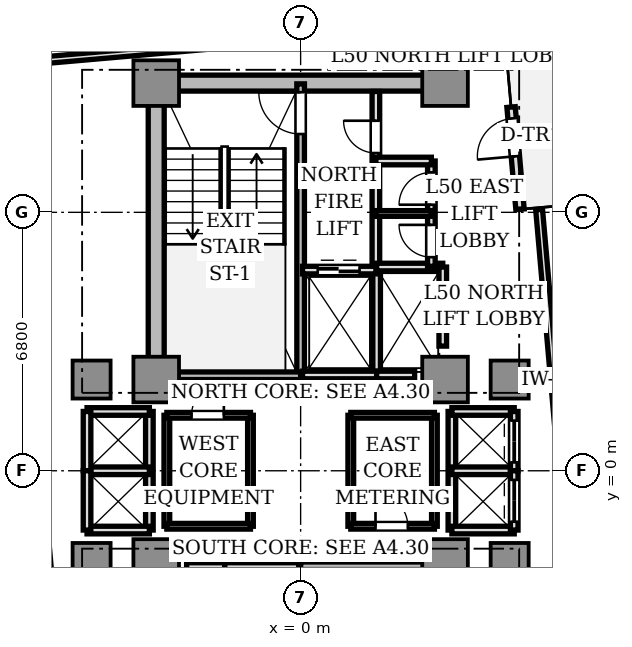
"""IFC4 building model, lengths in metres.
Left out: names, types, materials, properties, quantities, classifications, styles, units other than length and angle.
Written with IfcOpenShell. Run it as: python <this file> out.ifc"""

import sys

from ifc_helpers import new_model, si_unit, direction, frame, frame_2d, origin, origin_2d, place, context, subcontext, project, spatial, rectangle, extrude, source, transform, mapped, element, fill, save


model = new_model("IFC4")
c1 = context("Model", 3, precision=1e-05, world=origin(), true_north=direction((0.0, 1.0)))
c2 = subcontext(c1, "Body", "Model", "MODEL_VIEW")
j1 = project(units=[si_unit("LENGTHUNIT", "METRE"), si_unit("PLANEANGLEUNIT", "RADIAN")], contexts=[c1])
p1 = place(None, origin())
s1 = spatial("IfcSite", under=j1, at=p1, CompositionType="ELEMENT")
p2 = place(p1, origin())
s2 = spatial("IfcBuilding", under=s1, at=p2, CompositionType="ELEMENT")
p3 = place(p2, frame((0.0, 0.0, 181.9)))
s3 = spatial("IfcBuildingStorey", under=s2, at=p3, CompositionType="ELEMENT", Elevation=181.9)
p4 = place(p3, frame((-3.55, 10.2, 0.0), z_axis=(0.0, 0.0, 1.0), x_axis=(1.0, 0.0, 0.0)))
e1 = element("IfcWall", 1, at=p4, inside=s3, PredefinedType="SHEAR", context=c2, shape_type="SweptSolid", body=[
    extrude(rectangle(XDim=7.1, YDim=0.42, at=frame_2d((3.55, 0.0))), origin(), (0.0, 0.0, 1.0), 3.11),
])
p5 = place(p3, frame((-3.8, 2.85, 0.0), z_axis=(0.0, 0.0, 1.0), x_axis=(0.0, 1.0, 0.0)))
e2 = element("IfcWall", 2, at=p5, inside=s3, PredefinedType="SHEAR", context=c2, shape_type="SweptSolid", body=[
    extrude(rectangle(XDim=6.9, YDim=0.42, at=frame_2d((3.45, 0.0))), origin(), (0.0, 0.0, 1.0), 3.11),
])
m1 = source(origin(), c2, "Body", "SweptSolid", [
    extrude(rectangle(XDim=1.2, YDim=1.2, at=origin_2d()), origin(), (0.0, 0.0, 1.0), 3.11),
])
for number, where, z_axis, x_axis in (
    (3, (-3.8, 2.4, 0.0), (0.0, 0.0, 1.0), (1.0, 0.0, 0.0)),
    (4, (3.8, 2.4, 0.0), (0.0, 0.0, 1.0), (1.0, 0.0, 0.0)),
    (5, (-3.8, 10.2, 0.0), (0.0, 0.0, 1.0), (1.0, 0.0, 0.0)),
    (6, (3.8, 10.2, 0.0), (0.0, 0.0, 1.0), (1.0, 0.0, 0.0)),
    (7, (-3.8, -2.4, 0.0), (0.0, 0.0, 1.0), (1.0, 0.0, 0.0)),
    (8, (3.8, -2.4, 0.0), (0.0, 0.0, 1.0), (1.0, 0.0, 0.0)),
):
    element("IfcColumn", number, at=place(p3, frame(where, z_axis=z_axis, x_axis=x_axis)), inside=s3, PredefinedType="COLUMN", context=c2, shape_type="MappedRepresentation", body=[
        mapped(m1, transform((0.0, 0.0, 0.0), scale=1.0)),
    ])
m2 = source(origin(), c2, "Body", "SweptSolid", [
    extrude(rectangle(XDim=1.0, YDim=1.0, at=origin_2d()), origin(), (0.0, 0.0, 1.0), 3.11),
])
for number, where, z_axis, x_axis in (
    (9, (5.5, 2.4, 0.0), (0.0, 0.0, 1.0), (1.0, 0.0, 0.0)),
    (10, (-5.5, 2.4, 0.0), (0.0, 0.0, 1.0), (1.0, 0.0, 0.0)),
    (11, (5.5, -2.4, 0.0), (0.0, 0.0, 1.0), (1.0, 0.0, 0.0)),
    (12, (-5.5, -2.4, 0.0), (0.0, 0.0, 1.0), (1.0, 0.0, 0.0)),
):
    element("IfcColumn", number, at=place(p3, frame(where, z_axis=z_axis, x_axis=x_axis)), inside=s3, PredefinedType="COLUMN", context=c2, shape_type="MappedRepresentation", body=[
        mapped(m2, transform((0.0, 0.0, 0.0), scale=1.0)),
    ])
p6 = place(p3, frame((5.772, 6.879, 0.0), z_axis=(0.0, 0.0, 1.0), x_axis=(-0.087168071984, 0.996193619346, 0.0)))
e13 = element("IfcWall", 13, at=p6, inside=s3, PredefinedType="STANDARD", context=c2, shape_type="SweptSolid", body=[
    extrude(rectangle(XDim=2.7, YDim=0.22, at=frame_2d((1.35, 0.0))), origin(), (0.0, 0.0, 1.0), 3.11),
])
p7 = place(p6, frame((1.4, 0.0, 0.0)))
e14 = element("IfcOpeningElement", 14, at=p7, cuts=e13, PredefinedType="OPENING", context=c2, shape_type="SweptSolid", body=[
    extrude(rectangle(XDim=1.0, YDim=2.2, at=frame_2d((0.5, 1.1))), frame((0.0, 0.12, 0.0), z_axis=(0.0, -1.0, 0.0), x_axis=(1.0, 0.0, 0.0)), (0.0, 0.0, 1.0), 0.24),
])
p8 = place(p3, frame((0.0, 2.5, 0.0), z_axis=(0.0, 0.0, 1.0), x_axis=(0.0, 1.0, 0.0)))
e15 = element("IfcWall", 15, at=p8, inside=s3, PredefinedType="SOLIDWALL", context=c2, shape_type="SweptSolid", body=[
    extrude(rectangle(XDim=7.68, YDim=0.2, at=frame_2d((3.84, 0.0))), origin(), (0.0, 0.0, 1.0), 3.11),
])
p9 = place(p8, frame((6.36, 0.0, 0.0)))
e16 = element("IfcOpeningElement", 16, at=p9, cuts=e15, PredefinedType="OPENING", context=c2, shape_type="SweptSolid", body=[
    extrude(rectangle(XDim=1.1, YDim=2.15, at=frame_2d((0.55, 1.075))), frame((0.0, 0.11, 0.0), z_axis=(0.0, -1.0, 0.0), x_axis=(1.0, 0.0, 0.0)), (0.0, 0.0, 1.0), 0.22),
])
p10 = place(p3, frame((-3.72, 2.5, 0.0), z_axis=(0.0, 0.0, 1.0), x_axis=(1.0, 0.0, 0.0)))
e17 = element("IfcWall", 17, at=p10, inside=s3, PredefinedType="SOLIDWALL", context=c2, shape_type="SweptSolid", body=[
    extrude(rectangle(XDim=3.72, YDim=0.2, at=frame_2d((1.86, 0.0))), origin(), (0.0, 0.0, 1.0), 3.11),
])
p11 = place(p3, frame((0.0, -10.18, 0.0), z_axis=(0.0, 0.0, 1.0), x_axis=(0.0, 1.0, 0.0)))
e18 = element("IfcWall", 18, at=p11, inside=s3, PredefinedType="SOLIDWALL", context=c2, shape_type="SweptSolid", body=[
    extrude(rectangle(XDim=7.68, YDim=0.2, at=frame_2d((3.84, 0.0))), origin(), (0.0, 0.0, 1.0), 3.11),
])
p12 = place(p11, frame((0.28, 0.0, 0.0)))
e19 = element("IfcOpeningElement", 19, at=p12, cuts=e18, PredefinedType="OPENING", context=c2, shape_type="SweptSolid", body=[
    extrude(rectangle(XDim=1.1, YDim=2.15, at=frame_2d((0.55, 1.075))), frame((0.0, 0.11, 0.0), z_axis=(0.0, -1.0, 0.0), x_axis=(1.0, 0.0, 0.0)), (0.0, 0.0, 1.0), 0.22),
])
p13 = place(p3, frame((0.0, -2.5, 0.0), z_axis=(0.0, 0.0, 1.0), x_axis=(1.0, 0.0, 0.0)))
e20 = element("IfcWall", 20, at=p13, inside=s3, PredefinedType="SOLIDWALL", context=c2, shape_type="SweptSolid", body=[
    extrude(rectangle(XDim=3.72, YDim=0.2, at=frame_2d((1.86, 0.0))), origin(), (0.0, 0.0, 1.0), 3.11),
])
p14 = place(p3, frame((1.98, 5.32, 0.0), z_axis=(0.0, 0.0, 1.0), x_axis=(0.0, 1.0, 0.0)))
e21 = element("IfcWall", 21, at=p14, inside=s3, PredefinedType="SOLIDWALL", context=c2, shape_type="SweptSolid", body=[
    extrude(rectangle(XDim=4.66, YDim=0.2, at=frame_2d((2.33, 0.0))), origin(), (0.0, 0.0, 1.0), 2.66),
])
p15 = place(p14, frame((3.04, 0.0, 0.0)))
e22 = element("IfcOpeningElement", 22, at=p15, cuts=e21, PredefinedType="OPENING", context=c2, shape_type="SweptSolid", body=[
    extrude(rectangle(XDim=0.85, YDim=2.1, at=frame_2d((0.425, 1.05))), frame((0.0, 0.11, 0.0), z_axis=(0.0, -1.0, 0.0), x_axis=(1.0, 0.0, 0.0)), (0.0, 0.0, 1.0), 0.22),
])
p16 = place(p3, frame((2.0, 2.5, 0.0), z_axis=(0.0, 0.0, 1.0), x_axis=(0.0, 1.0, 0.0)))
e23 = element("IfcWall", 23, at=p16, inside=s3, PredefinedType="SOLIDWALL", context=c2, shape_type="SweptSolid", body=[
    extrude(rectangle(XDim=2.78, YDim=0.2, at=frame_2d((1.39, 0.0))), origin(), (0.0, 0.0, 1.0), 2.66),
])
p17 = place(p3, frame((0.05, 2.52, 0.0), z_axis=(0.0, 0.0, 1.0), x_axis=(1.0, 0.0, 0.0)))
e24 = element("IfcWall", 24, at=p17, inside=s3, PredefinedType="SOLIDWALL", context=c2, shape_type="SweptSolid", body=[
    extrude(rectangle(XDim=1.95, YDim=0.2, at=frame_2d((0.975, 0.0))), origin(), (0.0, 0.0, 1.0), 2.66),
])
p18 = place(p3, frame((0.05, 5.28, 0.0), z_axis=(0.0, 0.0, 1.0), x_axis=(1.0, 0.0, 0.0)))
e25 = element("IfcWall", 25, at=p18, inside=s3, PredefinedType="SOLIDWALL", context=c2, shape_type="SweptSolid", body=[
    extrude(rectangle(XDim=1.93, YDim=0.2, at=frame_2d((0.965, 0.0))), origin(), (0.0, 0.0, 1.0), 2.66),
])
p19 = place(p18, frame((0.4, 0.0, 0.0)))
e26 = element("IfcOpeningElement", 26, at=p19, cuts=e25, PredefinedType="OPENING", context=c2, shape_type="SweptSolid", body=[
    extrude(rectangle(XDim=1.1, YDim=2.2, at=frame_2d((0.55, 1.1))), frame((0.0, 0.11, 0.0), z_axis=(0.0, -1.0, 0.0), x_axis=(1.0, 0.0, 0.0)), (0.0, 0.0, 1.0), 0.22),
])
p20 = place(p3, frame((-2.0, -5.28, 0.0), z_axis=(0.0, 0.0, 1.0), x_axis=(0.0, 1.0, 0.0)))
e27 = element("IfcWall", 27, at=p20, inside=s3, PredefinedType="SOLIDWALL", context=c2, shape_type="SweptSolid", body=[
    extrude(rectangle(XDim=2.78, YDim=0.2, at=frame_2d((1.39, 0.0))), origin(), (0.0, 0.0, 1.0), 2.66),
])
p21 = place(p3, frame((-2.0, -2.52, 0.0), z_axis=(0.0, 0.0, 1.0), x_axis=(1.0, 0.0, 0.0)))
e28 = element("IfcWall", 28, at=p21, inside=s3, PredefinedType="SOLIDWALL", context=c2, shape_type="SweptSolid", body=[
    extrude(rectangle(XDim=1.95, YDim=0.2, at=frame_2d((0.975, 0.0))), origin(), (0.0, 0.0, 1.0), 2.66),
])
p22 = place(p3, frame((2.0, 2.52, 0.0), z_axis=(0.0, 0.0, 1.0), x_axis=(1.0, 0.0, 0.0)))
e29 = element("IfcWall", 29, at=p22, inside=s3, PredefinedType="SOLIDWALL", context=c2, shape_type="SweptSolid", body=[
    extrude(rectangle(XDim=1.0, YDim=0.2, at=frame_2d((0.5, 0.0))), origin(), (0.0, 0.0, 1.0), 2.66),
])
p23 = place(p3, frame((2.0, 5.36, 0.0), z_axis=(0.0, 0.0, 1.0), x_axis=(1.0, 0.0, 0.0)))
e30 = element("IfcWall", 30, at=p23, inside=s3, PredefinedType="SOLIDWALL", context=c2, shape_type="SweptSolid", body=[
    extrude(rectangle(XDim=1.74, YDim=0.2, at=frame_2d((0.87, 0.0))), origin(), (0.0, 0.0, 1.0), 2.66),
])
p24 = place(p3, frame((3.74, 3.28, 0.0), z_axis=(0.0, 0.0, 1.0), x_axis=(0.0, 1.0, 0.0)))
e31 = element("IfcWall", 31, at=p24, inside=s3, PredefinedType="SOLIDWALL", context=c2, shape_type="SweptSolid", body=[
    extrude(rectangle(XDim=2.08, YDim=0.2, at=frame_2d((1.04, 0.0))), origin(), (0.0, 0.0, 1.0), 2.66),
])
p25 = place(p24, frame((0.44, 0.0, 0.0)))
e32 = element("IfcOpeningElement", 32, at=p25, cuts=e31, PredefinedType="OPENING", context=c2, shape_type="SweptSolid", body=[
    extrude(rectangle(XDim=1.2, YDim=2.2, at=frame_2d((0.6, 1.1))), frame((0.0, 0.11, 0.0), z_axis=(0.0, -1.0, 0.0), x_axis=(1.0, 0.0, 0.0)), (0.0, 0.0, 1.0), 0.22),
])
p26 = place(p3, frame((-3.0, -2.52, 0.0), z_axis=(0.0, 0.0, 1.0), x_axis=(1.0, 0.0, 0.0)))
e33 = element("IfcWall", 33, at=p26, inside=s3, PredefinedType="SOLIDWALL", context=c2, shape_type="SweptSolid", body=[
    extrude(rectangle(XDim=1.0, YDim=0.2, at=frame_2d((0.5, 0.0))), origin(), (0.0, 0.0, 1.0), 2.66),
])
p27 = place(p3, frame((3.98, -1.56, 0.0), z_axis=(0.0, 0.0, 1.0), x_axis=(0.0, 1.0, 0.0)))
e34 = element("IfcWall", 34, at=p27, inside=s3, PredefinedType="SOLIDWALL", context=c2, shape_type="SweptSolid", body=[
    extrude(rectangle(XDim=3.12, YDim=0.2, at=frame_2d((1.56, 0.0))), origin(), (0.0, 0.0, 1.0), 2.28),
])
for number, where, z_axis, x_axis in (
    (35, (3.98, 1.56, 0.0), (0.0, 0.0, 1.0), (1.0, 0.0, 0.0)),
    (36, (3.98, -1.56, 0.0), (0.0, 0.0, 1.0), (1.0, 0.0, 0.0)),
    (37, (3.98, 0.0, 0.0), (0.0, 0.0, 1.0), (1.0, 0.0, 0.0)),
):
    element("IfcWall", number, at=place(p3, frame(where, z_axis=z_axis, x_axis=x_axis)), inside=s3, PredefinedType="SOLIDWALL", context=c2, shape_type="SweptSolid", body=[
        extrude(rectangle(XDim=1.64, YDim=0.2, at=frame_2d((0.82, 0.0))), origin(), (0.0, 0.0, 1.0), 2.66),
    ])
p28 = place(p3, frame((5.62, 0.0, 0.0), z_axis=(0.0, 0.0, 1.0), x_axis=(0.0, 1.0, 0.0)))
e38 = element("IfcWall", 38, at=p28, inside=s3, PredefinedType="SOLIDWALL", context=c2, shape_type="SweptSolid", body=[
    extrude(rectangle(XDim=1.56, YDim=0.2, at=frame_2d((0.78, 0.0))), origin(), (0.0, 0.0, 1.0), 2.66),
])
p29 = place(p28, frame((0.22, 0.0, 0.0)))
e39 = element("IfcOpeningElement", 39, at=p29, cuts=e38, PredefinedType="OPENING", context=c2, shape_type="SweptSolid", body=[
    extrude(rectangle(XDim=1.1, YDim=2.2, at=frame_2d((0.55, 1.1))), frame((0.0, 0.11, 0.0), z_axis=(0.0, -1.0, 0.0), x_axis=(1.0, 0.0, 0.0)), (0.0, 0.0, 1.0), 0.22),
])
p30 = place(p3, frame((5.62, -1.56, 0.0), z_axis=(0.0, 0.0, 1.0), x_axis=(0.0, 1.0, 0.0)))
e40 = element("IfcWall", 40, at=p30, inside=s3, PredefinedType="SOLIDWALL", context=c2, shape_type="SweptSolid", body=[
    extrude(rectangle(XDim=1.56, YDim=0.2, at=frame_2d((0.78, 0.0))), origin(), (0.0, 0.0, 1.0), 2.66),
])
p31 = place(p30, frame((0.22, 0.0, 0.0)))
e41 = element("IfcOpeningElement", 41, at=p31, cuts=e40, PredefinedType="OPENING", context=c2, shape_type="SweptSolid", body=[
    extrude(rectangle(XDim=1.1, YDim=2.2, at=frame_2d((0.55, 1.1))), frame((0.0, 0.11, 0.0), z_axis=(0.0, -1.0, 0.0), x_axis=(1.0, 0.0, 0.0)), (0.0, 0.0, 1.0), 0.22),
])
p32 = place(p3, frame((-3.98, -1.56, 0.0), z_axis=(0.0, 0.0, 1.0), x_axis=(0.0, 1.0, 0.0)))
e42 = element("IfcWall", 42, at=p32, inside=s3, PredefinedType="SOLIDWALL", context=c2, shape_type="SweptSolid", body=[
    extrude(rectangle(XDim=3.12, YDim=0.2, at=frame_2d((1.56, 0.0))), origin(), (0.0, 0.0, 1.0), 2.28),
])
for number, where, z_axis, x_axis in (
    (43, (-5.62, 1.56, 0.0), (0.0, 0.0, 1.0), (1.0, 0.0, 0.0)),
    (44, (-5.62, -1.56, 0.0), (0.0, 0.0, 1.0), (1.0, 0.0, 0.0)),
    (45, (-5.62, 0.0, 0.0), (0.0, 0.0, 1.0), (1.0, 0.0, 0.0)),
):
    element("IfcWall", number, at=place(p3, frame(where, z_axis=z_axis, x_axis=x_axis)), inside=s3, PredefinedType="SOLIDWALL", context=c2, shape_type="SweptSolid", body=[
        extrude(rectangle(XDim=1.64, YDim=0.2, at=frame_2d((0.82, 0.0))), origin(), (0.0, 0.0, 1.0), 2.66),
    ])
for number, where, z_axis, x_axis in (
    (46, (-5.62, 0.0, 0.0), (0.0, 0.0, 1.0), (0.0, 1.0, 0.0)),
    (47, (-5.62, -1.56, 0.0), (0.0, 0.0, 1.0), (0.0, 1.0, 0.0)),
):
    element("IfcWall", number, at=place(p3, frame(where, z_axis=z_axis, x_axis=x_axis)), inside=s3, PredefinedType="SOLIDWALL", context=c2, shape_type="SweptSolid", body=[
        extrude(rectangle(XDim=1.56, YDim=0.2, at=frame_2d((0.78, 0.0))), origin(), (0.0, 0.0, 1.0), 2.66),
    ])
p33 = place(p3, frame((3.44, 5.38, 0.0), z_axis=(0.0, 0.0, 1.0), x_axis=(0.0, 1.0, 0.0)))
e48 = element("IfcWall", 48, at=p33, inside=s3, PredefinedType="SOLIDWALL", context=c2, shape_type="SweptSolid", body=[
    extrude(rectangle(XDim=2.77, YDim=0.2, at=frame_2d((1.385, 0.0))), origin(), (0.0, 0.0, 1.0), 2.66),
])
p34 = place(p33, frame((0.24, 0.0, 0.0)))
e49 = element("IfcOpeningElement", 49, at=p34, cuts=e48, PredefinedType="OPENING", context=c2, shape_type="SweptSolid", body=[
    extrude(rectangle(XDim=0.85, YDim=2.1, at=frame_2d((0.425, 1.05))), frame((0.0, 0.11, 0.0), z_axis=(0.0, -1.0, 0.0), x_axis=(1.0, 0.0, 0.0)), (0.0, 0.0, 1.0), 0.22),
])
p35 = place(p33, frame((1.62, 0.0, 0.0)))
e50 = element("IfcOpeningElement", 50, at=p35, cuts=e48, PredefinedType="OPENING", context=c2, shape_type="SweptSolid", body=[
    extrude(rectangle(XDim=0.85, YDim=2.1, at=frame_2d((0.425, 1.05))), frame((0.0, 0.11, 0.0), z_axis=(0.0, -1.0, 0.0), x_axis=(1.0, 0.0, 0.0)), (0.0, 0.0, 1.0), 0.22),
])
p36 = place(p3, frame((1.98, 8.15, 0.0), z_axis=(0.0, 0.0, 1.0), x_axis=(1.0, 0.0, 0.0)))
e51 = element("IfcWall", 51, at=p36, inside=s3, PredefinedType="SOLIDWALL", context=c2, shape_type="SweptSolid", body=[
    extrude(rectangle(XDim=1.46, YDim=0.2, at=frame_2d((0.73, 0.0))), origin(), (0.0, 0.0, 1.0), 2.66),
])
p37 = place(p3, frame((1.98, 6.77, 0.0), z_axis=(0.0, 0.0, 1.0), x_axis=(1.0, 0.0, 0.0)))
e52 = element("IfcWall", 52, at=p37, inside=s3, PredefinedType="PARTITIONING", context=c2, shape_type="SweptSolid", body=[
    extrude(rectangle(XDim=1.46, YDim=0.15, at=frame_2d((0.73, 0.0))), origin(), (0.0, 0.0, 1.0), 2.66),
])
p38 = place(p3, frame((-1.32, -1.46, 0.0), z_axis=(0.0, 0.0, 1.0), x_axis=(0.0, 1.0, 0.0)))
e53 = element("IfcWall", 53, at=p38, inside=s3, PredefinedType="PARTITIONING", context=c2, shape_type="SweptSolid", body=[
    extrude(rectangle(XDim=2.92, YDim=0.15, at=frame_2d((1.46, 0.0))), origin(), (0.0, 0.0, 1.0), 2.66),
])
p39 = place(p3, frame((-3.52, -1.46, 0.0), z_axis=(0.0, 0.0, 1.0), x_axis=(0.0, 1.0, 0.0)))
e54 = element("IfcWall", 54, at=p39, inside=s3, PredefinedType="PARTITIONING", context=c2, shape_type="SweptSolid", body=[
    extrude(rectangle(XDim=2.92, YDim=0.15, at=frame_2d((1.46, 0.0))), origin(), (0.0, 0.0, 1.0), 2.28),
])
p40 = place(p3, frame((-3.52, 1.46, 0.0), z_axis=(0.0, 0.0, 1.0), x_axis=(1.0, 0.0, 0.0)))
e55 = element("IfcWall", 55, at=p40, inside=s3, PredefinedType="PARTITIONING", context=c2, shape_type="SweptSolid", body=[
    extrude(rectangle(XDim=2.2, YDim=0.15, at=frame_2d((1.1, 0.0))), origin(), (0.0, 0.0, 1.0), 2.66),
])
p41 = place(p40, frame((0.65, 0.0, 0.0)))
e56 = element("IfcOpeningElement", 56, at=p41, cuts=e55, PredefinedType="OPENING", context=c2, shape_type="SweptSolid", body=[
    extrude(rectangle(XDim=0.85, YDim=2.1, at=frame_2d((0.425, 1.05))), frame((0.0, 0.085, 0.0), z_axis=(0.0, -1.0, 0.0), x_axis=(1.0, 0.0, 0.0)), (0.0, 0.0, 1.0), 0.17),
])
p42 = place(p3, frame((-3.52, -1.46, 0.0), z_axis=(0.0, 0.0, 1.0), x_axis=(1.0, 0.0, 0.0)))
e57 = element("IfcWall", 57, at=p42, inside=s3, PredefinedType="PARTITIONING", context=c2, shape_type="SweptSolid", body=[
    extrude(rectangle(XDim=2.2, YDim=0.15, at=frame_2d((1.1, 0.0))), origin(), (0.0, 0.0, 1.0), 2.66),
])
p43 = place(p3, frame((1.32, -1.46, 0.0), z_axis=(0.0, 0.0, 1.0), x_axis=(0.0, 1.0, 0.0)))
e58 = element("IfcWall", 58, at=p43, inside=s3, PredefinedType="PARTITIONING", context=c2, shape_type="SweptSolid", body=[
    extrude(rectangle(XDim=2.92, YDim=0.15, at=frame_2d((1.46, 0.0))), origin(), (0.0, 0.0, 1.0), 2.66),
])
p44 = place(p3, frame((3.52, -1.46, 0.0), z_axis=(0.0, 0.0, 1.0), x_axis=(0.0, 1.0, 0.0)))
e59 = element("IfcWall", 59, at=p44, inside=s3, PredefinedType="PARTITIONING", context=c2, shape_type="SweptSolid", body=[
    extrude(rectangle(XDim=2.92, YDim=0.15, at=frame_2d((1.46, 0.0))), origin(), (0.0, 0.0, 1.0), 2.28),
])
p45 = place(p3, frame((1.32, 1.46, 0.0), z_axis=(0.0, 0.0, 1.0), x_axis=(1.0, 0.0, 0.0)))
e60 = element("IfcWall", 60, at=p45, inside=s3, PredefinedType="PARTITIONING", context=c2, shape_type="SweptSolid", body=[
    extrude(rectangle(XDim=2.2, YDim=0.15, at=frame_2d((1.1, 0.0))), origin(), (0.0, 0.0, 1.0), 2.66),
])
p46 = place(p3, frame((1.32, -1.46, 0.0), z_axis=(0.0, 0.0, 1.0), x_axis=(1.0, 0.0, 0.0)))
e61 = element("IfcWall", 61, at=p46, inside=s3, PredefinedType="PARTITIONING", context=c2, shape_type="SweptSolid", body=[
    extrude(rectangle(XDim=2.2, YDim=0.15, at=frame_2d((1.1, 0.0))), origin(), (0.0, 0.0, 1.0), 2.66),
])
p47 = place(p46, frame((0.65, 0.0, 0.0)))
e62 = element("IfcOpeningElement", 62, at=p47, cuts=e61, PredefinedType="OPENING", context=c2, shape_type="SweptSolid", body=[
    extrude(rectangle(XDim=0.85, YDim=2.1, at=frame_2d((0.425, 1.05))), frame((0.0, 0.085, 0.0), z_axis=(0.0, -1.0, 0.0), x_axis=(1.0, 0.0, 0.0)), (0.0, 0.0, 1.0), 0.17),
])
p48 = place(p3, frame((7.181, -3.487, 0.0), z_axis=(0.0, 0.0, 1.0), x_axis=(-0.087163455754, 0.996194023261, 0.0)))
e63 = element("IfcWall", 63, at=p48, inside=s3, PredefinedType="PARTITIONING", context=c2, shape_type="SweptSolid", body=[
    extrude(rectangle(XDim=10.4, YDim=0.18, at=frame_2d((5.2, 0.0))), origin(), (0.0, 0.0, 1.0), 2.66),
])
for number, where, z_axis, x_axis in (
    (64, (-1.936, 11.224, 0.0), (0.0, 0.0, 1.0), (-0.996, -0.087, 0.0)),
    (65, (-6.741, -1.543, 0.0), (0.0, 0.0, 1.0), (0.087, -0.996, 0.0)),
):
    element("IfcWall", number, at=place(p3, frame(where, z_axis=z_axis, x_axis=x_axis)), inside=s3, PredefinedType="PARTITIONING", context=c2, shape_type="SweptSolid", body=[
        extrude(rectangle(XDim=5.35, YDim=0.18, at=frame_2d((2.675, 0.0))), origin(), (0.0, 0.0, 1.0), 2.66),
    ])
m3 = source(origin(), c2, "Body", "SweptSolid", [
    extrude(rectangle(XDim=1.0, YDim=0.05, at=origin_2d()), origin(), (0.0, 0.0, 1.0), 2.2),
])
p49 = place(p7, frame((0.5, 0.0, 0.0)))
e66 = element("IfcDoor", 66, at=p49, inside=s3, OperationType="SINGLE_SWING_LEFT", PredefinedType="DOOR", context=c2, shape_type="MappedRepresentation", body=[
    mapped(m3, transform((0.0, 0.0, 0.0), scale=1.0)),
])
fill(e14, e66)
m4 = source(origin(), c2, "Body", "SweptSolid", [
    extrude(rectangle(XDim=1.1, YDim=0.05, at=origin_2d()), origin(), (0.0, 0.0, 1.0), 2.15),
])
p50 = place(p9, frame((0.55, 0.0, 0.0)))
e67 = element("IfcDoor", 67, at=p50, inside=s3, OperationType="SINGLE_SWING_RIGHT", PredefinedType="DOOR", context=c2, shape_type="MappedRepresentation", body=[
    mapped(m4, transform((0.0, 0.0, 0.0), scale=1.0)),
])
fill(e16, e67)
m5 = source(origin(), c2, "Body", "SweptSolid", [
    extrude(rectangle(XDim=0.85, YDim=0.05, at=origin_2d()), origin(), (0.0, 0.0, 1.0), 2.1),
])
p51 = place(p15, frame((0.425, 0.0, 0.0)))
e68 = element("IfcDoor", 68, at=p51, inside=s3, OperationType="SINGLE_SWING_RIGHT", PredefinedType="DOOR", context=c2, shape_type="MappedRepresentation", body=[
    mapped(m5, transform((0.0, 0.0, 0.0), scale=1.0)),
])
fill(e22, e68)
m6 = source(origin(), c2, "Body", "SweptSolid", [
    extrude(rectangle(XDim=1.1, YDim=0.05, at=origin_2d()), origin(), (0.0, 0.0, 1.0), 2.2),
])
p52 = place(p19, frame((0.55, 0.0, 0.0)))
e69 = element("IfcDoor", 69, at=p52, inside=s3, OperationType="DOUBLE_DOOR_SLIDING", PredefinedType="DOOR", context=c2, shape_type="MappedRepresentation", body=[
    mapped(m6, transform((0.0, 0.0, 0.0), scale=1.0)),
])
fill(e26, e69)
m7 = source(origin(), c2, "Body", "SweptSolid", [
    extrude(rectangle(XDim=1.2, YDim=0.05, at=origin_2d()), origin(), (0.0, 0.0, 1.0), 2.2),
])
p53 = place(p25, frame((0.6, 0.0, 0.0)))
e70 = element("IfcDoor", 70, at=p53, inside=s3, OperationType="DOUBLE_DOOR_SLIDING", PredefinedType="DOOR", context=c2, shape_type="MappedRepresentation", body=[
    mapped(m7, transform((0.0, 0.0, 0.0), scale=1.0)),
])
fill(e32, e70)
p54 = place(p29, frame((0.55, 0.0, 0.0)))
e71 = element("IfcDoor", 71, at=p54, inside=s3, OperationType="DOUBLE_DOOR_SLIDING", PredefinedType="DOOR", context=c2, shape_type="MappedRepresentation", body=[
    mapped(m6, transform((0.0, 0.0, 0.0), scale=1.0)),
])
fill(e39, e71)
p55 = place(p31, frame((0.55, 0.0, 0.0)))
e72 = element("IfcDoor", 72, at=p55, inside=s3, OperationType="DOUBLE_DOOR_SLIDING", PredefinedType="DOOR", context=c2, shape_type="MappedRepresentation", body=[
    mapped(m6, transform((0.0, 0.0, 0.0), scale=1.0)),
])
fill(e41, e72)
p56 = place(p34, frame((0.425, 0.0, 0.0)))
e73 = element("IfcDoor", 73, at=p56, inside=s3, OperationType="SINGLE_SWING_RIGHT", PredefinedType="DOOR", context=c2, shape_type="MappedRepresentation", body=[
    mapped(m5, transform((0.0, 0.0, 0.0), scale=1.0)),
])
fill(e49, e73)
p57 = place(p35, frame((0.425, 0.0, 0.0)))
e74 = element("IfcDoor", 74, at=p57, inside=s3, OperationType="SINGLE_SWING_LEFT", PredefinedType="DOOR", context=c2, shape_type="MappedRepresentation", body=[
    mapped(m5, transform((0.0, 0.0, 0.0), scale=1.0)),
])
fill(e50, e74)
p58 = place(p41, frame((0.425, 0.0, 0.0)))
e75 = element("IfcDoor", 75, at=p58, inside=s3, OperationType="SINGLE_SWING_RIGHT", PredefinedType="DOOR", context=c2, shape_type="MappedRepresentation", body=[
    mapped(m5, transform((0.0, 0.0, 0.0), scale=1.0)),
])
fill(e56, e75)
p59 = place(p47, frame((0.425, 0.0, 0.0)))
e76 = element("IfcDoor", 76, at=p59, inside=s3, OperationType="SINGLE_SWING_LEFT", PredefinedType="DOOR", context=c2, shape_type="MappedRepresentation", body=[
    mapped(m5, transform((0.0, 0.0, 0.0), scale=1.0)),
])
fill(e62, e76)
save(model, sys.argv[1])
